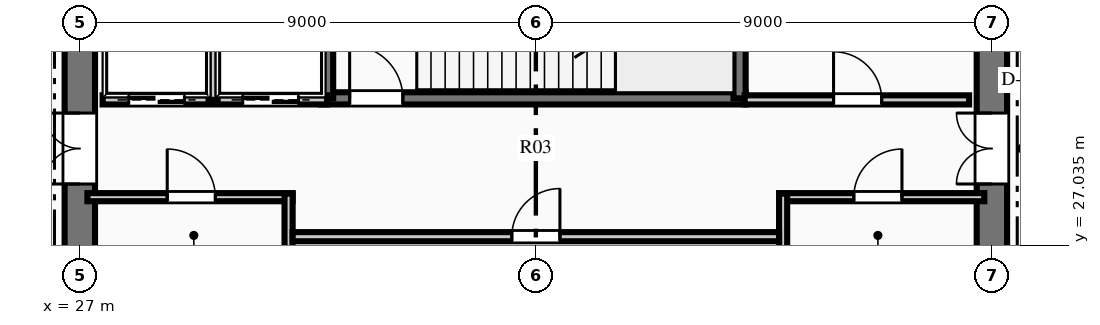
"""IFC4 building model, lengths in metres.
Left out: names, types, materials, properties, quantities, classifications, styles, units other than length and angle.
Written with IfcOpenShell. Run it as: python <this file> out.ifc"""

import sys

from ifc_helpers import new_model, si_unit, direction, frame, frame_2d, origin, place, context, subcontext, project, spatial, rectangle, extrude, element, fill, save


model = new_model("IFC4")
c1 = context("Model", 3, precision=1e-05, world=origin(), true_north=direction((0.0, 1.0)))
c2 = subcontext(c1, "Body", "Model", "MODEL_VIEW")
j1 = project(units=[si_unit("LENGTHUNIT", "METRE"), si_unit("PLANEANGLEUNIT", "RADIAN")], contexts=[c1])
p1 = place(None, origin())
s1 = spatial("IfcSite", under=j1, at=p1, CompositionType="ELEMENT")
p2 = place(p1, origin())
s2 = spatial("IfcBuilding", under=s1, at=p2, CompositionType="ELEMENT")
p3 = place(p2, frame((0.0, 0.0, -5.2)))
s3 = spatial("IfcBuildingStorey", under=s2, at=p3, CompositionType="ELEMENT", Elevation=-5.2)
p4 = place(p3, frame((27.0, 18.3, -0.3), z_axis=(0.0, 0.0, 1.0), x_axis=(0.0, 1.0, 0.0)))
e1 = element("IfcWall", 1, at=p4, inside=s3, PredefinedType="SHEAR", context=c2, shape_type="SweptSolid", body=[
    extrude(rectangle(XDim=15.4, YDim=0.6, at=frame_2d((7.7, 0.0))), origin(), (0.0, 0.0, 1.0), 5.5),
])
p5 = place(p4, frame((9.94, 0.0, 0.3)))
e2 = element("IfcOpeningElement", 2, at=p5, cuts=e1, PredefinedType="OPENING", context=c2, shape_type="SweptSolid", body=[
    extrude(rectangle(XDim=1.4, YDim=2.2, at=frame_2d((0.7, 1.1))), frame((0.0, 0.31, 0.0), z_axis=(0.0, -1.0, 0.0), x_axis=(1.0, 0.0, 0.0)), (0.0, 0.0, 1.0), 0.62),
])
p6 = place(p3, frame((45.0, 18.3, -0.3), z_axis=(0.0, 0.0, 1.0), x_axis=(0.0, 1.0, 0.0)))
e3 = element("IfcWall", 3, at=p6, inside=s3, PredefinedType="SHEAR", context=c2, shape_type="SweptSolid", body=[
    extrude(rectangle(XDim=15.4, YDim=0.6, at=frame_2d((7.7, 0.0))), origin(), (0.0, 0.0, 1.0), 5.5),
])
p7 = place(p6, frame((9.94, 0.0, 0.3)))
e4 = element("IfcOpeningElement", 4, at=p7, cuts=e3, PredefinedType="OPENING", context=c2, shape_type="SweptSolid", body=[
    extrude(rectangle(XDim=1.4, YDim=2.2, at=frame_2d((0.7, 1.1))), frame((0.0, 0.31, 0.0), z_axis=(0.0, -1.0, 0.0), x_axis=(1.0, 0.0, 0.0)), (0.0, 0.0, 1.0), 0.62),
])
p8 = place(p3, frame((31.76, 29.93, -0.3), z_axis=(0.0, 0.0, 1.0), x_axis=(1.0, 0.0, 0.0)))
e5 = element("IfcWall", 5, at=p8, inside=s3, PredefinedType="SHEAR", context=c2, shape_type="SweptSolid", body=[
    extrude(rectangle(XDim=8.38, YDim=0.24, at=frame_2d((4.19, 0.0))), origin(), (0.0, 0.0, 1.0), 5.5),
])
p9 = place(p8, frame((0.565, 0.0, 0.3)))
e6 = element("IfcOpeningElement", 6, at=p9, cuts=e5, PredefinedType="OPENING", context=c2, shape_type="SweptSolid", body=[
    extrude(rectangle(XDim=1.05, YDim=2.15, at=frame_2d((0.525, 1.075))), frame((0.0, 0.13, 0.0), z_axis=(0.0, -1.0, 0.0), x_axis=(1.0, 0.0, 0.0)), (0.0, 0.0, 1.0), 0.26),
])
p10 = place(p3, frame((31.88, 29.93, -0.3), z_axis=(0.0, 0.0, 1.0), x_axis=(0.0, 1.0, 0.0)))
e7 = element("IfcWall", 7, at=p10, inside=s3, PredefinedType="SHEAR", context=c2, shape_type="SweptSolid", body=[
    extrude(rectangle(XDim=3.79, YDim=0.24, at=frame_2d((1.895, 0.0))), origin(), (0.0, 0.0, 1.0), 5.5),
])
p11 = place(p3, frame((40.02, 29.93, -0.3), z_axis=(0.0, 0.0, 1.0), x_axis=(0.0, 1.0, 0.0)))
e8 = element("IfcWall", 8, at=p11, inside=s3, PredefinedType="SHEAR", context=c2, shape_type="SweptSolid", body=[
    extrude(rectangle(XDim=3.85, YDim=0.24, at=frame_2d((1.925, 0.0))), origin(), (0.0, 0.0, 1.0), 5.5),
])
p12 = place(p3, frame((27.15, 27.98, 0.0), z_axis=(0.0, 0.0, 1.0), x_axis=(1.0, 0.0, 0.0)))
e9 = element("IfcWall", 9, at=p12, inside=s3, PredefinedType="PARTITIONING", context=c2, shape_type="SweptSolid", body=[
    extrude(rectangle(XDim=4.05, YDim=0.16, at=frame_2d((2.025, 0.0))), origin(), (0.0, 0.0, 1.0), 4.84),
])
p13 = place(p12, frame((1.575, 0.0, 0.0)))
e10 = element("IfcOpeningElement", 10, at=p13, cuts=e9, PredefinedType="OPENING", context=c2, shape_type="SweptSolid", body=[
    extrude(rectangle(XDim=0.95, YDim=2.15, at=frame_2d((0.475, 1.075))), frame((0.0, 0.09, 0.0), z_axis=(0.0, -1.0, 0.0), x_axis=(1.0, 0.0, 0.0)), (0.0, 0.0, 1.0), 0.18),
])
p14 = place(p3, frame((31.12, 26.54, 0.0), z_axis=(0.0, 0.0, 1.0), x_axis=(0.0, 1.0, 0.0)))
e11 = element("IfcWall", 11, at=p14, inside=s3, PredefinedType="PARTITIONING", context=c2, shape_type="SweptSolid", body=[
    extrude(rectangle(XDim=1.51, YDim=0.16, at=frame_2d((0.755, 0.0))), origin(), (0.0, 0.0, 1.0), 4.84),
])
p15 = place(p3, frame((40.8, 27.98, 0.0), z_axis=(0.0, 0.0, 1.0), x_axis=(1.0, 0.0, 0.0)))
e12 = element("IfcWall", 12, at=p15, inside=s3, PredefinedType="PARTITIONING", context=c2, shape_type="SweptSolid", body=[
    extrude(rectangle(XDim=4.05, YDim=0.16, at=frame_2d((2.025, 0.0))), origin(), (0.0, 0.0, 1.0), 4.84),
])
p16 = place(p15, frame((1.475, 0.0, 0.0)))
e13 = element("IfcOpeningElement", 13, at=p16, cuts=e12, PredefinedType="OPENING", context=c2, shape_type="SweptSolid", body=[
    extrude(rectangle(XDim=0.95, YDim=2.15, at=frame_2d((0.475, 1.075))), frame((0.0, 0.09, 0.0), z_axis=(0.0, -1.0, 0.0), x_axis=(1.0, 0.0, 0.0)), (0.0, 0.0, 1.0), 0.18),
])
p17 = place(p3, frame((40.88, 26.54, 0.0), z_axis=(0.0, 0.0, 1.0), x_axis=(0.0, 1.0, 0.0)))
e14 = element("IfcWall", 14, at=p17, inside=s3, PredefinedType="PARTITIONING", context=c2, shape_type="SweptSolid", body=[
    extrude(rectangle(XDim=1.51, YDim=0.16, at=frame_2d((0.755, 0.0))), origin(), (0.0, 0.0, 1.0), 4.84),
])
p18 = place(p3, frame((27.45, 29.9, 0.0), z_axis=(0.0, 0.0, 1.0), x_axis=(1.0, 0.0, 0.0)))
e15 = element("IfcWall", 15, at=p18, inside=s3, PredefinedType="PARTITIONING", context=c2, shape_type="SweptSolid", body=[
    extrude(rectangle(XDim=4.43, YDim=0.18, at=frame_2d((2.215, 0.0))), origin(), (0.0, 0.0, 1.0), 4.84),
])
p19 = place(p18, frame((0.515, 0.0, 0.0)))
e16 = element("IfcOpeningElement", 16, at=p19, cuts=e15, PredefinedType="OPENING", context=c2, shape_type="SweptSolid", body=[
    extrude(rectangle(XDim=1.1, YDim=2.15, at=frame_2d((0.55, 1.075))), frame((0.0, 0.1, 0.0), z_axis=(0.0, -1.0, 0.0), x_axis=(1.0, 0.0, 0.0)), (0.0, 0.0, 1.0), 0.2),
])
p20 = place(p18, frame((2.765, 0.0, 0.0)))
e17 = element("IfcOpeningElement", 17, at=p20, cuts=e15, PredefinedType="OPENING", context=c2, shape_type="SweptSolid", body=[
    extrude(rectangle(XDim=1.1, YDim=2.15, at=frame_2d((0.55, 1.075))), frame((0.0, 0.1, 0.0), z_axis=(0.0, -1.0, 0.0), x_axis=(1.0, 0.0, 0.0)), (0.0, 0.0, 1.0), 0.2),
])
p21 = place(p3, frame((29.63, 29.9, 0.0), z_axis=(0.0, 0.0, 1.0), x_axis=(0.0, 1.0, 0.0)))
e18 = element("IfcWall", 18, at=p21, inside=s3, PredefinedType="PARTITIONING", context=c2, shape_type="SweptSolid", body=[
    extrude(rectangle(XDim=3.75, YDim=0.18, at=frame_2d((1.875, 0.0))), origin(), (0.0, 0.0, 1.0), 4.84),
])
p22 = place(p3, frame((40.12, 29.9, 0.0), z_axis=(0.0, 0.0, 1.0), x_axis=(1.0, 0.0, 0.0)))
e19 = element("IfcWall", 19, at=p22, inside=s3, PredefinedType="PARTITIONING", context=c2, shape_type="SweptSolid", body=[
    extrude(rectangle(XDim=4.43, YDim=0.18, at=frame_2d((2.215, 0.0))), origin(), (0.0, 0.0, 1.0), 4.84),
])
p23 = place(p22, frame((1.755, 0.0, 0.0)))
e20 = element("IfcOpeningElement", 20, at=p23, cuts=e19, PredefinedType="OPENING", context=c2, shape_type="SweptSolid", body=[
    extrude(rectangle(XDim=0.95, YDim=2.15, at=frame_2d((0.475, 1.075))), frame((0.0, 0.1, 0.0), z_axis=(0.0, -1.0, 0.0), x_axis=(1.0, 0.0, 0.0)), (0.0, 0.0, 1.0), 0.2),
])
p24 = place(p3, frame((31.2, 27.2, 0.0), z_axis=(0.0, 0.0, 1.0), x_axis=(1.0, 0.0, 0.0)))
e21 = element("IfcWall", 21, at=p24, inside=s3, PredefinedType="PARTITIONING", context=c2, shape_type="SweptSolid", body=[
    extrude(rectangle(XDim=9.6, YDim=0.18, at=frame_2d((4.8, 0.0))), origin(), (0.0, 0.0, 1.0), 4.84),
])
p25 = place(p24, frame((4.325, 0.0, 0.0)))
e22 = element("IfcOpeningElement", 22, at=p25, cuts=e21, PredefinedType="OPENING", context=c2, shape_type="SweptSolid", body=[
    extrude(rectangle(XDim=0.95, YDim=2.15, at=frame_2d((0.475, 1.075))), frame((0.0, 0.1, 0.0), z_axis=(0.0, -1.0, 0.0), x_axis=(1.0, 0.0, 0.0)), (0.0, 0.0, 1.0), 0.2),
])
p26 = place(p13, origin())
e23 = element("IfcDoor", 23, at=p26, inside=s3, OperationType="SINGLE_SWING_LEFT", PredefinedType="DOOR", context=c2, shape_type="SweptSolid", body=[
    extrude(rectangle(XDim=0.95, YDim=2.15, at=frame_2d((0.475, 1.075))), frame((0.0, 0.025, 0.0), z_axis=(0.0, -1.0, 0.0), x_axis=(1.0, 0.0, 0.0)), (0.0, 0.0, 1.0), 0.05),
])
fill(e10, e23)
p27 = place(p16, origin())
e24 = element("IfcDoor", 24, at=p27, inside=s3, OperationType="SINGLE_SWING_RIGHT", PredefinedType="DOOR", context=c2, shape_type="SweptSolid", body=[
    extrude(rectangle(XDim=0.95, YDim=2.15, at=frame_2d((0.475, 1.075))), frame((0.0, 0.025, 0.0), z_axis=(0.0, -1.0, 0.0), x_axis=(1.0, 0.0, 0.0)), (0.0, 0.0, 1.0), 0.05),
])
fill(e13, e24)
p28 = place(p23, origin())
e25 = element("IfcDoor", 25, at=p28, inside=s3, OperationType="SINGLE_SWING_LEFT", PredefinedType="DOOR", context=c2, shape_type="SweptSolid", body=[
    extrude(rectangle(XDim=0.95, YDim=2.15, at=frame_2d((0.475, 1.075))), frame((0.0, 0.025, 0.0), z_axis=(0.0, -1.0, 0.0), x_axis=(1.0, 0.0, 0.0)), (0.0, 0.0, 1.0), 0.05),
])
fill(e20, e25)
p29 = place(p25, origin())
e26 = element("IfcDoor", 26, at=p29, inside=s3, OperationType="SINGLE_SWING_RIGHT", PredefinedType="DOOR", context=c2, shape_type="SweptSolid", body=[
    extrude(rectangle(XDim=0.95, YDim=2.15, at=frame_2d((0.475, 1.075))), frame((0.0, 0.025, 0.0), z_axis=(0.0, -1.0, 0.0), x_axis=(1.0, 0.0, 0.0)), (0.0, 0.0, 1.0), 0.05),
])
fill(e22, e26)
p30 = place(p9, origin())
e27 = element("IfcDoor", 27, at=p30, inside=s3, OperationType="SINGLE_SWING_LEFT", PredefinedType="DOOR", context=c2, shape_type="SweptSolid", body=[
    extrude(rectangle(XDim=1.05, YDim=2.15, at=frame_2d((0.525, 1.075))), frame((0.0, 0.025, 0.0), z_axis=(0.0, -1.0, 0.0), x_axis=(1.0, 0.0, 0.0)), (0.0, 0.0, 1.0), 0.05),
])
fill(e6, e27)
p31 = place(p5, origin())
e28 = element("IfcDoor", 28, at=p31, inside=s3, OperationType="DOUBLE_DOOR_SINGLE_SWING", PredefinedType="DOOR", context=c2, shape_type="SweptSolid", body=[
    extrude(rectangle(XDim=1.4, YDim=2.2, at=frame_2d((0.7, 1.1))), frame((0.0, 0.025, 0.0), z_axis=(0.0, -1.0, 0.0), x_axis=(1.0, 0.0, 0.0)), (0.0, 0.0, 1.0), 0.05),
])
fill(e2, e28)
p32 = place(p7, origin())
e29 = element("IfcDoor", 29, at=p32, inside=s3, OperationType="DOUBLE_DOOR_SINGLE_SWING", PredefinedType="DOOR", context=c2, shape_type="SweptSolid", body=[
    extrude(rectangle(XDim=1.4, YDim=2.2, at=frame_2d((0.7, 1.1))), frame((0.0, 0.025, 0.0), z_axis=(0.0, -1.0, 0.0), x_axis=(1.0, 0.0, 0.0)), (0.0, 0.0, 1.0), 0.05),
])
fill(e4, e29)
p33 = place(p19, origin())
e30 = element("IfcDoor", 30, at=p33, inside=s3, OperationType="SLIDING_TO_LEFT", PredefinedType="DOOR", context=c2, shape_type="SweptSolid", body=[
    extrude(rectangle(XDim=1.1, YDim=2.15, at=frame_2d((0.55, 1.075))), frame((0.0, 0.025, 0.0), z_axis=(0.0, -1.0, 0.0), x_axis=(1.0, 0.0, 0.0)), (0.0, 0.0, 1.0), 0.05),
])
fill(e16, e30)
p34 = place(p20, origin())
e31 = element("IfcDoor", 31, at=p34, inside=s3, OperationType="SLIDING_TO_LEFT", PredefinedType="DOOR", context=c2, shape_type="SweptSolid", body=[
    extrude(rectangle(XDim=1.1, YDim=2.15, at=frame_2d((0.55, 1.075))), frame((0.0, 0.025, 0.0), z_axis=(0.0, -1.0, 0.0), x_axis=(1.0, 0.0, 0.0)), (0.0, 0.0, 1.0), 0.05),
])
fill(e17, e31)
save(model, sys.argv[1])
